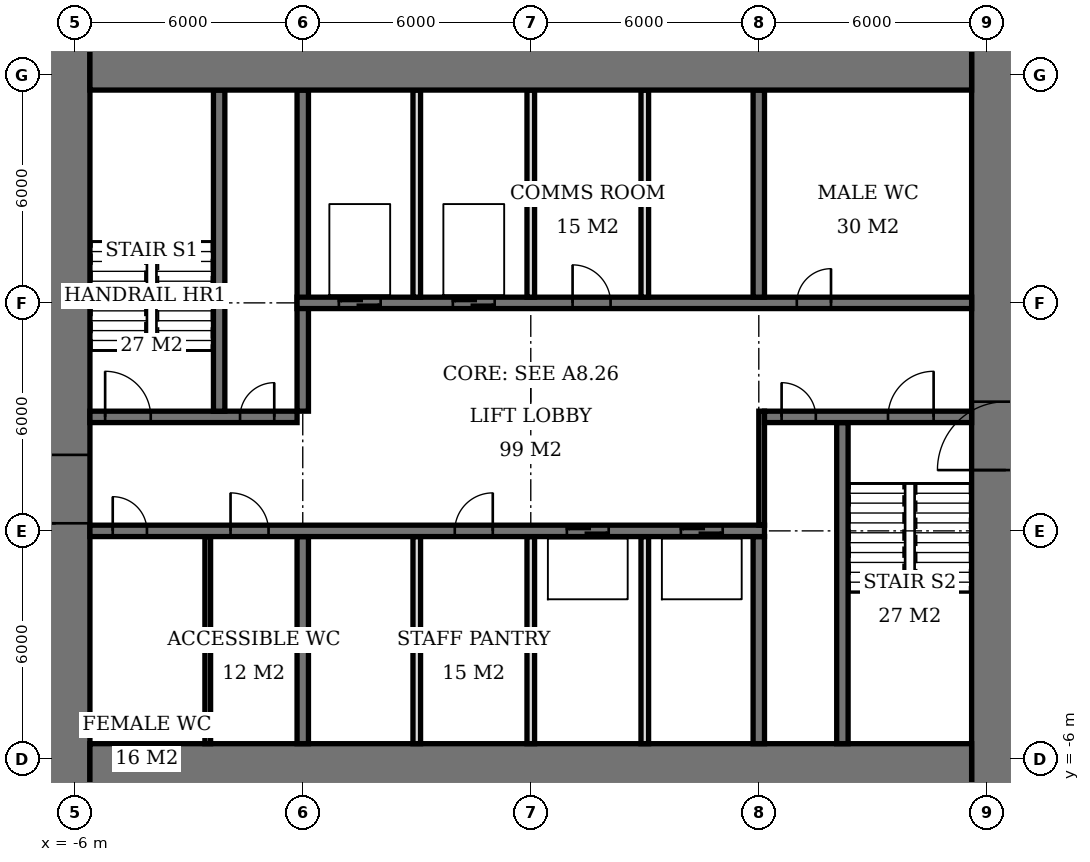
"""IFC4 building model, lengths in metres.
Left out: names, types, materials, properties, quantities, classifications, styles, units other than length and angle.
Written with IfcOpenShell. Run it as: python <this file> out.ifc"""

import sys

from ifc_helpers import new_model, si_unit, direction, frame, frame_2d, origin, place, context, subcontext, project, spatial, rectangle, extrude, element, fill, save


model = new_model("IFC4")
c1 = context("Model", 3, precision=1e-05, world=origin(), true_north=direction((0.0, 1.0)))
c2 = subcontext(c1, "Body", "Model", "MODEL_VIEW")
j1 = project(units=[si_unit("LENGTHUNIT", "METRE"), si_unit("PLANEANGLEUNIT", "RADIAN")], contexts=[c1])
p1 = place(None, origin())
s1 = spatial("IfcSite", under=j1, at=p1, CompositionType="ELEMENT")
p2 = place(p1, origin())
s2 = spatial("IfcBuilding", under=s1, at=p2, CompositionType="ELEMENT")
p3 = place(p2, frame((0.0, 0.0, 188.9)))
s3 = spatial("IfcBuildingStorey", under=s2, at=p3, CompositionType="ELEMENT", Elevation=188.9)
for number, where, z_axis, x_axis in (
    (1, (-5.6, -6.6, 0.0), (0.0, 0.0, 1.0), (1.0, 0.0, 0.0)),
    (2, (-5.6, 12.6, 0.0), (0.0, 0.0, 1.0), (1.0, 0.0, 0.0)),
):
    element("IfcWall", number, at=place(p3, frame(where, z_axis=z_axis, x_axis=x_axis)), inside=s3, PredefinedType="SHEAR", context=c2, shape_type="SweptSolid", body=[
        extrude(rectangle(XDim=23.2, YDim=2.0, at=frame_2d((11.6, 0.0))), origin(), (0.0, 0.0, 1.0), 3.9),
    ])
p4 = place(p3, frame((-6.5, -7.6, 0.0), z_axis=(0.0, 0.0, 1.0), x_axis=(0.0, 1.0, 0.0)))
e3 = element("IfcWall", 3, at=p4, inside=s3, PredefinedType="SHEAR", context=c2, shape_type="SweptSolid", body=[
    extrude(rectangle(XDim=21.2, YDim=1.8, at=frame_2d((10.6, 0.0))), origin(), (0.0, 0.0, 1.0), 3.9),
])
p5 = place(p4, frame((7.8, 0.0, 0.0)))
e4 = element("IfcOpeningElement", 4, at=p5, cuts=e3, PredefinedType="OPENING", context=c2, shape_type="SweptSolid", body=[
    extrude(rectangle(XDim=1.8, YDim=2.4, at=frame_2d((0.9, 1.2))), frame((0.0, 0.91, 0.0), z_axis=(0.0, -1.0, 0.0), x_axis=(1.0, 0.0, 0.0)), (0.0, 0.0, 1.0), 1.82),
])
p6 = place(p3, frame((18.5, -7.6, 0.0), z_axis=(0.0, 0.0, 1.0), x_axis=(0.0, 1.0, 0.0)))
e5 = element("IfcWall", 5, at=p6, inside=s3, PredefinedType="SHEAR", context=c2, shape_type="SweptSolid", body=[
    extrude(rectangle(XDim=21.2, YDim=1.8, at=frame_2d((10.6, 0.0))), origin(), (0.0, 0.0, 1.0), 3.9),
])
p7 = place(p6, frame((9.2, 0.0, 0.0)))
e6 = element("IfcOpeningElement", 6, at=p7, cuts=e5, PredefinedType="OPENING", context=c2, shape_type="SweptSolid", body=[
    extrude(rectangle(XDim=1.8, YDim=2.4, at=frame_2d((0.9, 1.2))), frame((0.0, 0.91, 0.0), z_axis=(0.0, -1.0, 0.0), x_axis=(1.0, 0.0, 0.0)), (0.0, 0.0, 1.0), 1.82),
])
p8 = place(p3, frame((-5.6, 0.0, 0.0), z_axis=(0.0, 0.0, 1.0), x_axis=(1.0, 0.0, 0.0)))
e7 = element("IfcWall", 7, at=p8, inside=s3, PredefinedType="SHEAR", context=c2, shape_type="SweptSolid", body=[
    extrude(rectangle(XDim=17.75, YDim=0.3, at=frame_2d((8.875, 0.0))), origin(), (0.0, 0.0, 1.0), 3.9),
])
p9 = place(p8, frame((0.6, 0.0, 0.0)))
e8 = element("IfcOpeningElement", 8, at=p9, cuts=e7, PredefinedType="OPENING", context=c2, shape_type="SweptSolid", body=[
    extrude(rectangle(XDim=0.9, YDim=2.1, at=frame_2d((0.45, 1.05))), frame((0.0, 0.16, 0.0), z_axis=(0.0, -1.0, 0.0), x_axis=(1.0, 0.0, 0.0)), (0.0, 0.0, 1.0), 0.32),
])
p10 = place(p8, frame((3.7, 0.0, 0.0)))
e9 = element("IfcOpeningElement", 9, at=p10, cuts=e7, PredefinedType="OPENING", context=c2, shape_type="SweptSolid", body=[
    extrude(rectangle(XDim=1.0, YDim=2.1, at=frame_2d((0.5, 1.05))), frame((0.0, 0.16, 0.0), z_axis=(0.0, -1.0, 0.0), x_axis=(1.0, 0.0, 0.0)), (0.0, 0.0, 1.0), 0.32),
])
p11 = place(p8, frame((9.6, 0.0, 0.0)))
e10 = element("IfcOpeningElement", 10, at=p11, cuts=e7, PredefinedType="OPENING", context=c2, shape_type="SweptSolid", body=[
    extrude(rectangle(XDim=1.0, YDim=2.1, at=frame_2d((0.5, 1.05))), frame((0.0, 0.16, 0.0), z_axis=(0.0, -1.0, 0.0), x_axis=(1.0, 0.0, 0.0)), (0.0, 0.0, 1.0), 0.32),
])
p12 = place(p8, frame((12.55, 0.0, 0.0)))
e11 = element("IfcOpeningElement", 11, at=p12, cuts=e7, PredefinedType="OPENING", context=c2, shape_type="SweptSolid", body=[
    extrude(rectangle(XDim=1.1, YDim=2.1, at=frame_2d((0.55, 1.05))), frame((0.0, 0.16, 0.0), z_axis=(0.0, -1.0, 0.0), x_axis=(1.0, 0.0, 0.0)), (0.0, 0.0, 1.0), 0.32),
])
p13 = place(p8, frame((15.55, 0.0, 0.0)))
e12 = element("IfcOpeningElement", 12, at=p13, cuts=e7, PredefinedType="OPENING", context=c2, shape_type="SweptSolid", body=[
    extrude(rectangle(XDim=1.1, YDim=2.1, at=frame_2d((0.55, 1.05))), frame((0.0, 0.16, 0.0), z_axis=(0.0, -1.0, 0.0), x_axis=(1.0, 0.0, 0.0)), (0.0, 0.0, 1.0), 0.32),
])
p14 = place(p3, frame((-5.6, 3.0, 0.0), z_axis=(0.0, 0.0, 1.0), x_axis=(1.0, 0.0, 0.0)))
e13 = element("IfcWall", 13, at=p14, inside=s3, PredefinedType="SHEAR", context=c2, shape_type="SweptSolid", body=[
    extrude(rectangle(XDim=5.45, YDim=0.3, at=frame_2d((2.725, 0.0))), origin(), (0.0, 0.0, 1.0), 3.9),
])
p15 = place(p14, frame((0.4, 0.0, 0.0)))
e14 = element("IfcOpeningElement", 14, at=p15, cuts=e13, PredefinedType="OPENING", context=c2, shape_type="SweptSolid", body=[
    extrude(rectangle(XDim=1.2, YDim=2.1, at=frame_2d((0.6, 1.05))), frame((0.0, 0.16, 0.0), z_axis=(0.0, -1.0, 0.0), x_axis=(1.0, 0.0, 0.0)), (0.0, 0.0, 1.0), 0.32),
])
p16 = place(p14, frame((3.95, 0.0, 0.0)))
e15 = element("IfcOpeningElement", 15, at=p16, cuts=e13, PredefinedType="OPENING", context=c2, shape_type="SweptSolid", body=[
    extrude(rectangle(XDim=0.9, YDim=2.1, at=frame_2d((0.45, 1.05))), frame((0.0, 0.16, 0.0), z_axis=(0.0, -1.0, 0.0), x_axis=(1.0, 0.0, 0.0)), (0.0, 0.0, 1.0), 0.32),
])
p17 = place(p3, frame((12.15, 3.0, 0.0), z_axis=(0.0, 0.0, 1.0), x_axis=(1.0, 0.0, 0.0)))
e16 = element("IfcWall", 16, at=p17, inside=s3, PredefinedType="SHEAR", context=c2, shape_type="SweptSolid", body=[
    extrude(rectangle(XDim=5.45, YDim=0.3, at=frame_2d((2.725, 0.0))), origin(), (0.0, 0.0, 1.0), 3.9),
])
p18 = place(p17, frame((3.25, 0.0, 0.0)))
e17 = element("IfcOpeningElement", 17, at=p18, cuts=e16, PredefinedType="OPENING", context=c2, shape_type="SweptSolid", body=[
    extrude(rectangle(XDim=1.2, YDim=2.1, at=frame_2d((0.6, 1.05))), frame((0.0, 0.16, 0.0), z_axis=(0.0, -1.0, 0.0), x_axis=(1.0, 0.0, 0.0)), (0.0, 0.0, 1.0), 0.32),
])
p19 = place(p17, frame((0.45, 0.0, 0.0)))
e18 = element("IfcOpeningElement", 18, at=p19, cuts=e16, PredefinedType="OPENING", context=c2, shape_type="SweptSolid", body=[
    extrude(rectangle(XDim=0.9, YDim=2.1, at=frame_2d((0.45, 1.05))), frame((0.0, 0.16, 0.0), z_axis=(0.0, -1.0, 0.0), x_axis=(1.0, 0.0, 0.0)), (0.0, 0.0, 1.0), 0.32),
])
p20 = place(p3, frame((-0.15, 6.0, 0.0), z_axis=(0.0, 0.0, 1.0), x_axis=(1.0, 0.0, 0.0)))
e19 = element("IfcWall", 19, at=p20, inside=s3, PredefinedType="SHEAR", context=c2, shape_type="SweptSolid", body=[
    extrude(rectangle(XDim=17.75, YDim=0.3, at=frame_2d((8.875, 0.0))), origin(), (0.0, 0.0, 1.0), 3.9),
])
p21 = place(p20, frame((13.15, 0.0, 0.0)))
e20 = element("IfcOpeningElement", 20, at=p21, cuts=e19, PredefinedType="OPENING", context=c2, shape_type="SweptSolid", body=[
    extrude(rectangle(XDim=0.9, YDim=2.1, at=frame_2d((0.45, 1.05))), frame((0.0, 0.16, 0.0), z_axis=(0.0, -1.0, 0.0), x_axis=(1.0, 0.0, 0.0)), (0.0, 0.0, 1.0), 0.32),
])
p22 = place(p20, frame((7.25, 0.0, 0.0)))
e21 = element("IfcOpeningElement", 21, at=p22, cuts=e19, PredefinedType="OPENING", context=c2, shape_type="SweptSolid", body=[
    extrude(rectangle(XDim=1.0, YDim=2.1, at=frame_2d((0.5, 1.05))), frame((0.0, 0.16, 0.0), z_axis=(0.0, -1.0, 0.0), x_axis=(1.0, 0.0, 0.0)), (0.0, 0.0, 1.0), 0.32),
])
p23 = place(p20, frame((1.1, 0.0, 0.0)))
e22 = element("IfcOpeningElement", 22, at=p23, cuts=e19, PredefinedType="OPENING", context=c2, shape_type="SweptSolid", body=[
    extrude(rectangle(XDim=1.1, YDim=2.1, at=frame_2d((0.55, 1.05))), frame((0.0, 0.16, 0.0), z_axis=(0.0, -1.0, 0.0), x_axis=(1.0, 0.0, 0.0)), (0.0, 0.0, 1.0), 0.32),
])
p24 = place(p20, frame((4.1, 0.0, 0.0)))
e23 = element("IfcOpeningElement", 23, at=p24, cuts=e19, PredefinedType="OPENING", context=c2, shape_type="SweptSolid", body=[
    extrude(rectangle(XDim=1.1, YDim=2.1, at=frame_2d((0.55, 1.05))), frame((0.0, 0.16, 0.0), z_axis=(0.0, -1.0, 0.0), x_axis=(1.0, 0.0, 0.0)), (0.0, 0.0, 1.0), 0.32),
])
p25 = place(p3, frame((0.0, -5.6, 0.0), z_axis=(0.0, 0.0, 1.0), x_axis=(0.0, 1.0, 0.0)))
e24 = element("IfcWall", 24, at=p25, inside=s3, PredefinedType="SHEAR", context=c2, shape_type="SweptSolid", body=[
    extrude(rectangle(XDim=5.45, YDim=0.3, at=frame_2d((2.725, 0.0))), origin(), (0.0, 0.0, 1.0), 3.9),
])
p26 = place(p3, frame((0.0, 3.15, 0.0), z_axis=(0.0, 0.0, 1.0), x_axis=(0.0, 1.0, 0.0)))
e25 = element("IfcWall", 25, at=p26, inside=s3, PredefinedType="SHEAR", context=c2, shape_type="SweptSolid", body=[
    extrude(rectangle(XDim=8.45, YDim=0.3, at=frame_2d((4.225, 0.0))), origin(), (0.0, 0.0, 1.0), 3.9),
])
for number, where, z_axis, x_axis in (
    (26, (12.0, -5.6, 0.0), (0.0, 0.0, 1.0), (0.0, 1.0, 0.0)),
    (27, (12.0, 6.15, 0.0), (0.0, 0.0, 1.0), (0.0, 1.0, 0.0)),
):
    element("IfcWall", number, at=place(p3, frame(where, z_axis=z_axis, x_axis=x_axis)), inside=s3, PredefinedType="SHEAR", context=c2, shape_type="SweptSolid", body=[
        extrude(rectangle(XDim=5.45, YDim=0.3, at=frame_2d((2.725, 0.0))), origin(), (0.0, 0.0, 1.0), 3.9),
    ])
for number, where, z_axis, x_axis in (
    (28, (-2.2, 3.15, 0.0), (0.0, 0.0, 1.0), (0.0, 1.0, 0.0)),
    (29, (14.2, -5.6, 0.0), (0.0, 0.0, 1.0), (0.0, 1.0, 0.0)),
):
    element("IfcWall", number, at=place(p3, frame(where, z_axis=z_axis, x_axis=x_axis)), inside=s3, PredefinedType="SHEAR", context=c2, shape_type="SweptSolid", body=[
        extrude(rectangle(XDim=8.45, YDim=0.3, at=frame_2d((4.225, 0.0))), origin(), (0.0, 0.0, 1.0), 3.9),
    ])
for number, where, z_axis, x_axis in (
    (30, (3.0, 6.15, 0.0), (0.0, 0.0, 1.0), (0.0, 1.0, 0.0)),
    (31, (6.0, 6.15, 0.0), (0.0, 0.0, 1.0), (0.0, 1.0, 0.0)),
    (32, (9.0, 6.15, 0.0), (0.0, 0.0, 1.0), (0.0, 1.0, 0.0)),
    (33, (3.0, -5.6, 0.0), (0.0, 0.0, 1.0), (0.0, 1.0, 0.0)),
    (34, (6.0, -5.6, 0.0), (0.0, 0.0, 1.0), (0.0, 1.0, 0.0)),
    (35, (9.0, -5.6, 0.0), (0.0, 0.0, 1.0), (0.0, 1.0, 0.0)),
):
    element("IfcWall", number, at=place(p3, frame(where, z_axis=z_axis, x_axis=x_axis)), inside=s3, PredefinedType="SOLIDWALL", context=c2, shape_type="SweptSolid", body=[
        extrude(rectangle(XDim=5.45, YDim=0.2, at=frame_2d((2.725, 0.0))), origin(), (0.0, 0.0, 1.0), 3.9),
    ])
p27 = place(p3, frame((-2.5, -5.6, 0.0), z_axis=(0.0, 0.0, 1.0), x_axis=(0.0, 1.0, 0.0)))
e36 = element("IfcWall", 36, at=p27, inside=s3, PredefinedType="PLUMBINGWALL", context=c2, shape_type="SweptSolid", body=[
    extrude(rectangle(XDim=5.45, YDim=0.15, at=frame_2d((2.725, 0.0))), origin(), (0.0, 0.0, 1.0), 3.65),
])
p28 = place(p3, frame((12.075, 0.15, 0.0), z_axis=(0.0, 0.0, 1.0), x_axis=(0.0, 1.0, 0.0)))
e37 = element("IfcWall", 37, at=p28, inside=s3, PredefinedType="PARTITIONING", context=c2, shape_type="SweptSolid", body=[
    extrude(rectangle(XDim=3.0, YDim=0.15, at=frame_2d((1.5, 0.0))), origin(), (0.0, 0.0, 1.0), 3.65),
])
p29 = place(p5, origin())
e38 = element("IfcDoor", 38, at=p29, inside=s3, OperationType="DOUBLE_DOOR_SINGLE_SWING", PredefinedType="DOOR", context=c2, shape_type="SweptSolid", body=[
    extrude(rectangle(XDim=1.8, YDim=2.4, at=frame_2d((0.9, 1.2))), frame((0.0, 0.025, 0.0), z_axis=(0.0, -1.0, 0.0), x_axis=(1.0, 0.0, 0.0)), (0.0, 0.0, 1.0), 0.05),
])
fill(e4, e38)
p30 = place(p7, origin())
e39 = element("IfcDoor", 39, at=p30, inside=s3, OperationType="DOUBLE_DOOR_SINGLE_SWING", PredefinedType="DOOR", context=c2, shape_type="SweptSolid", body=[
    extrude(rectangle(XDim=1.8, YDim=2.4, at=frame_2d((0.9, 1.2))), frame((0.0, 0.025, 0.0), z_axis=(0.0, -1.0, 0.0), x_axis=(1.0, 0.0, 0.0)), (0.0, 0.0, 1.0), 0.05),
])
fill(e6, e39)
p31 = place(p15, origin())
e40 = element("IfcDoor", 40, at=p31, inside=s3, OperationType="SINGLE_SWING_LEFT", PredefinedType="DOOR", context=c2, shape_type="SweptSolid", body=[
    extrude(rectangle(XDim=1.2, YDim=2.1, at=frame_2d((0.6, 1.05))), frame((0.0, 0.025, 0.0), z_axis=(0.0, -1.0, 0.0), x_axis=(1.0, 0.0, 0.0)), (0.0, 0.0, 1.0), 0.05),
])
fill(e14, e40)
p32 = place(p16, origin())
e41 = element("IfcDoor", 41, at=p32, inside=s3, OperationType="SINGLE_SWING_RIGHT", PredefinedType="DOOR", context=c2, shape_type="SweptSolid", body=[
    extrude(rectangle(XDim=0.9, YDim=2.1, at=frame_2d((0.45, 1.05))), frame((0.0, 0.025, 0.0), z_axis=(0.0, -1.0, 0.0), x_axis=(1.0, 0.0, 0.0)), (0.0, 0.0, 1.0), 0.05),
])
fill(e15, e41)
p33 = place(p18, origin())
e42 = element("IfcDoor", 42, at=p33, inside=s3, OperationType="SINGLE_SWING_RIGHT", PredefinedType="DOOR", context=c2, shape_type="SweptSolid", body=[
    extrude(rectangle(XDim=1.2, YDim=2.1, at=frame_2d((0.6, 1.05))), frame((0.0, 0.025, 0.0), z_axis=(0.0, -1.0, 0.0), x_axis=(1.0, 0.0, 0.0)), (0.0, 0.0, 1.0), 0.05),
])
fill(e17, e42)
p34 = place(p19, origin())
e43 = element("IfcDoor", 43, at=p34, inside=s3, OperationType="SINGLE_SWING_LEFT", PredefinedType="DOOR", context=c2, shape_type="SweptSolid", body=[
    extrude(rectangle(XDim=0.9, YDim=2.1, at=frame_2d((0.45, 1.05))), frame((0.0, 0.025, 0.0), z_axis=(0.0, -1.0, 0.0), x_axis=(1.0, 0.0, 0.0)), (0.0, 0.0, 1.0), 0.05),
])
fill(e18, e43)
p35 = place(p9, origin())
e44 = element("IfcDoor", 44, at=p35, inside=s3, OperationType="SINGLE_SWING_LEFT", PredefinedType="DOOR", context=c2, shape_type="SweptSolid", body=[
    extrude(rectangle(XDim=0.9, YDim=2.1, at=frame_2d((0.45, 1.05))), frame((0.0, 0.025, 0.0), z_axis=(0.0, -1.0, 0.0), x_axis=(1.0, 0.0, 0.0)), (0.0, 0.0, 1.0), 0.05),
])
fill(e8, e44)
p36 = place(p10, origin())
e45 = element("IfcDoor", 45, at=p36, inside=s3, OperationType="SINGLE_SWING_LEFT", PredefinedType="DOOR", context=c2, shape_type="SweptSolid", body=[
    extrude(rectangle(XDim=1.0, YDim=2.1, at=frame_2d((0.5, 1.05))), frame((0.0, 0.025, 0.0), z_axis=(0.0, -1.0, 0.0), x_axis=(1.0, 0.0, 0.0)), (0.0, 0.0, 1.0), 0.05),
])
fill(e9, e45)
p37 = place(p21, origin())
e46 = element("IfcDoor", 46, at=p37, inside=s3, OperationType="SINGLE_SWING_RIGHT", PredefinedType="DOOR", context=c2, shape_type="SweptSolid", body=[
    extrude(rectangle(XDim=0.9, YDim=2.1, at=frame_2d((0.45, 1.05))), frame((0.0, 0.025, 0.0), z_axis=(0.0, -1.0, 0.0), x_axis=(1.0, 0.0, 0.0)), (0.0, 0.0, 1.0), 0.05),
])
fill(e20, e46)
p38 = place(p22, origin())
e47 = element("IfcDoor", 47, at=p38, inside=s3, OperationType="SINGLE_SWING_LEFT", PredefinedType="DOOR", context=c2, shape_type="SweptSolid", body=[
    extrude(rectangle(XDim=1.0, YDim=2.1, at=frame_2d((0.5, 1.05))), frame((0.0, 0.025, 0.0), z_axis=(0.0, -1.0, 0.0), x_axis=(1.0, 0.0, 0.0)), (0.0, 0.0, 1.0), 0.05),
])
fill(e21, e47)
p39 = place(p11, origin())
e48 = element("IfcDoor", 48, at=p39, inside=s3, OperationType="SINGLE_SWING_RIGHT", PredefinedType="DOOR", context=c2, shape_type="SweptSolid", body=[
    extrude(rectangle(XDim=1.0, YDim=2.1, at=frame_2d((0.5, 1.05))), frame((0.0, 0.025, 0.0), z_axis=(0.0, -1.0, 0.0), x_axis=(1.0, 0.0, 0.0)), (0.0, 0.0, 1.0), 0.05),
])
fill(e10, e48)
p40 = place(p23, origin())
e49 = element("IfcDoor", 49, at=p40, inside=s3, OperationType="DOUBLE_DOOR_SLIDING", PredefinedType="USERDEFINED", context=c2, shape_type="SweptSolid", body=[
    extrude(rectangle(XDim=1.1, YDim=2.1, at=frame_2d((0.55, 1.05))), frame((0.0, 0.025, 0.0), z_axis=(0.0, -1.0, 0.0), x_axis=(1.0, 0.0, 0.0)), (0.0, 0.0, 1.0), 0.05),
])
fill(e22, e49)
p41 = place(p24, origin())
e50 = element("IfcDoor", 50, at=p41, inside=s3, OperationType="DOUBLE_DOOR_SLIDING", PredefinedType="USERDEFINED", context=c2, shape_type="SweptSolid", body=[
    extrude(rectangle(XDim=1.1, YDim=2.1, at=frame_2d((0.55, 1.05))), frame((0.0, 0.025, 0.0), z_axis=(0.0, -1.0, 0.0), x_axis=(1.0, 0.0, 0.0)), (0.0, 0.0, 1.0), 0.05),
])
fill(e23, e50)
p42 = place(p12, origin())
e51 = element("IfcDoor", 51, at=p42, inside=s3, OperationType="DOUBLE_DOOR_SLIDING", PredefinedType="USERDEFINED", context=c2, shape_type="SweptSolid", body=[
    extrude(rectangle(XDim=1.1, YDim=2.1, at=frame_2d((0.55, 1.05))), frame((0.0, 0.025, 0.0), z_axis=(0.0, -1.0, 0.0), x_axis=(1.0, 0.0, 0.0)), (0.0, 0.0, 1.0), 0.05),
])
fill(e11, e51)
p43 = place(p13, origin())
e52 = element("IfcDoor", 52, at=p43, inside=s3, OperationType="DOUBLE_DOOR_SLIDING", PredefinedType="USERDEFINED", context=c2, shape_type="SweptSolid", body=[
    extrude(rectangle(XDim=1.1, YDim=2.1, at=frame_2d((0.55, 1.05))), frame((0.0, 0.025, 0.0), z_axis=(0.0, -1.0, 0.0), x_axis=(1.0, 0.0, 0.0)), (0.0, 0.0, 1.0), 0.05),
])
fill(e12, e52)
save(model, sys.argv[1])
